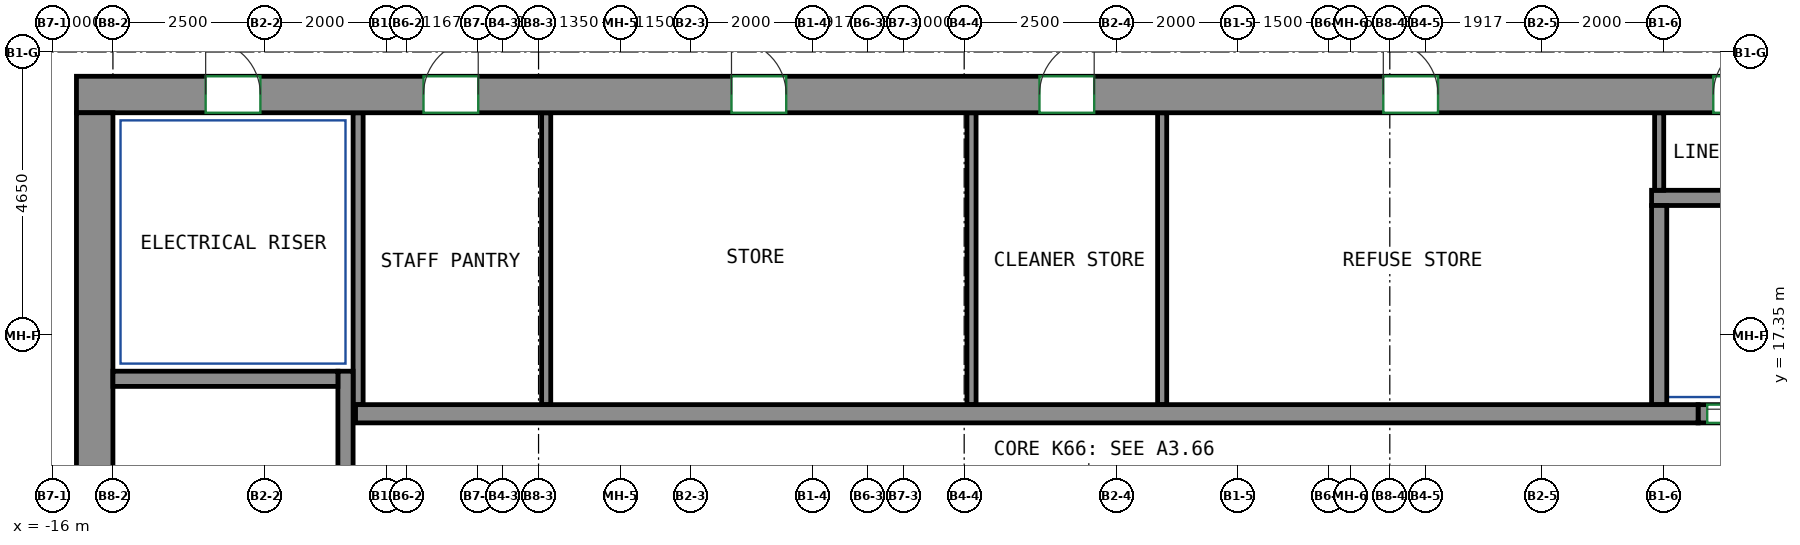
"""IFC4 building model, lengths in metres.
Left out: names, types, materials, properties, quantities, classifications, styles, units other than length and angle.
Written with IfcOpenShell. Run it as: python <this file> out.ifc"""

import sys

from ifc_helpers import new_model, si_unit, direction, frame, frame_2d, origin, place, context, subcontext, project, spatial, rectangle, extrude, source, transform, mapped, element, fill, save


model = new_model("IFC4")
c1 = context("Model", 3, precision=1e-05, world=origin(), true_north=direction((0.0, 1.0)))
c2 = subcontext(c1, "Body", "Model", "MODEL_VIEW")
j1 = project(units=[si_unit("LENGTHUNIT", "METRE"), si_unit("PLANEANGLEUNIT", "RADIAN")], contexts=[c1])
p1 = place(None, origin())
s1 = spatial("IfcSite", under=j1, at=p1, CompositionType="ELEMENT")
p2 = place(p1, origin())
s2 = spatial("IfcBuilding", under=s1, at=p2, CompositionType="ELEMENT")
p3 = place(p2, frame((0.0, 0.0, 267.0)))
s3 = spatial("IfcBuildingStorey", under=s2, at=p3, CompositionType="ELEMENT", Elevation=267.0)
m1 = source(origin(), c2, "Body", "SweptSolid", [
    extrude(rectangle(XDim=33.3, YDim=0.6, at=frame_2d((16.65, 0.0))), origin(), (0.0, 0.0, 1.0), 3.12),
])
p4 = place(p3, frame((-15.6, 21.3, 0.0), z_axis=(0.0, 0.0, 1.0), x_axis=(1.0, 0.0, 0.0)))
e1 = element("IfcWall", 1, at=p4, inside=s3, PredefinedType="SHEAR", context=c2, shape_type="MappedRepresentation", body=[
    mapped(m1, transform((0.0, 0.0, 0.0))),
])
p5 = place(p4, frame((5.708, 0.0, 0.0)))
e2 = element("IfcOpeningElement", 2, at=p5, cuts=e1, PredefinedType="OPENING", context=c2, shape_type="SweptSolid", body=[
    extrude(rectangle(XDim=0.9, YDim=2.1, at=frame_2d((0.45, 1.05))), frame((0.0, 0.31, 0.0), z_axis=(0.0, -1.0, 0.0), x_axis=(1.0, 0.0, 0.0)), (0.0, 0.0, 1.0), 0.62),
])
p6 = place(p4, frame((10.773, 0.0, 0.0)))
e3 = element("IfcOpeningElement", 3, at=p6, cuts=e1, PredefinedType="OPENING", context=c2, shape_type="SweptSolid", body=[
    extrude(rectangle(XDim=0.9, YDim=2.1, at=frame_2d((0.45, 1.05))), frame((0.0, 0.31, 0.0), z_axis=(0.0, -1.0, 0.0), x_axis=(1.0, 0.0, 0.0)), (0.0, 0.0, 1.0), 0.62),
])
p7 = place(p4, frame((15.838, 0.0, 0.0)))
e4 = element("IfcOpeningElement", 4, at=p7, cuts=e1, PredefinedType="OPENING", context=c2, shape_type="SweptSolid", body=[
    extrude(rectangle(XDim=0.9, YDim=2.1, at=frame_2d((0.45, 1.05))), frame((0.0, 0.31, 0.0), z_axis=(0.0, -1.0, 0.0), x_axis=(1.0, 0.0, 0.0)), (0.0, 0.0, 1.0), 0.62),
])
p8 = place(p4, frame((21.493, 0.0, 0.0)))
e5 = element("IfcOpeningElement", 5, at=p8, cuts=e1, PredefinedType="OPENING", context=c2, shape_type="SweptSolid", body=[
    extrude(rectangle(XDim=0.9, YDim=2.1, at=frame_2d((0.45, 1.05))), frame((0.0, 0.31, 0.0), z_axis=(0.0, -1.0, 0.0), x_axis=(1.0, 0.0, 0.0)), (0.0, 0.0, 1.0), 0.62),
])
p9 = place(p4, frame((26.92, 0.0, 0.0)))
e6 = element("IfcOpeningElement", 6, at=p9, cuts=e1, PredefinedType="OPENING", context=c2, shape_type="SweptSolid", body=[
    extrude(rectangle(XDim=0.9, YDim=2.1, at=frame_2d((0.45, 1.05))), frame((0.0, 0.31, 0.0), z_axis=(0.0, -1.0, 0.0), x_axis=(1.0, 0.0, 0.0)), (0.0, 0.0, 1.0), 0.62),
])
p10 = place(p4, frame((2.125, 0.0, 0.0)))
e7 = element("IfcOpeningElement", 7, at=p10, cuts=e1, PredefinedType="OPENING", context=c2, shape_type="SweptSolid", body=[
    extrude(rectangle(XDim=0.9, YDim=2.1, at=frame_2d((0.45, 1.05))), frame((0.0, 0.31, 0.0), z_axis=(0.0, -1.0, 0.0), x_axis=(1.0, 0.0, 0.0)), (0.0, 0.0, 1.0), 0.62),
])
p11 = place(p4, frame((30.275, 0.0, 0.0)))
e8 = element("IfcOpeningElement", 8, at=p11, cuts=e1, PredefinedType="OPENING", context=c2, shape_type="SweptSolid", body=[
    extrude(rectangle(XDim=0.9, YDim=2.1, at=frame_2d((0.45, 1.05))), frame((0.0, 0.31, 0.0), z_axis=(0.0, -1.0, 0.0), x_axis=(1.0, 0.0, 0.0)), (0.0, 0.0, 1.0), 0.62),
])
m2 = source(origin(), c2, "Body", "SweptSolid", [
    extrude(rectangle(XDim=12.0, YDim=0.6, at=frame_2d((6.0, 0.0))), origin(), (0.0, 0.0, 1.0), 3.12),
])
p12 = place(p3, frame((-15.3, 9.0, 0.0), z_axis=(0.0, 0.0, 1.0), x_axis=(0.0, 1.0, 0.0)))
e9 = element("IfcWall", 9, at=p12, inside=s3, PredefinedType="SHEAR", context=c2, shape_type="MappedRepresentation", body=[
    mapped(m2, transform((0.0, 0.0, 0.0))),
])
m3 = source(origin(), c2, "Body", "SweptSolid", [
    extrude(rectangle(XDim=7.75, YDim=0.25, at=frame_2d((3.875, 0.0))), origin(), (0.0, 0.0, 1.0), 3.12),
])
p13 = place(p3, frame((-11.175, 9.0, 0.0), z_axis=(0.0, 0.0, 1.0), x_axis=(0.0, 1.0, 0.0)))
e10 = element("IfcWall", 10, at=p13, inside=s3, PredefinedType="SHEAR", context=c2, shape_type="MappedRepresentation", body=[
    mapped(m3, transform((0.0, 0.0, 0.0))),
])
m4 = source(origin(), c2, "Body", "SweptSolid", [
    extrude(rectangle(XDim=3.7, YDim=0.25, at=frame_2d((1.85, 0.0))), origin(), (0.0, 0.0, 1.0), 3.12),
])
p14 = place(p3, frame((-15.0, 16.625, 0.0), z_axis=(0.0, 0.0, 1.0), x_axis=(1.0, 0.0, 0.0)))
e11 = element("IfcWall", 11, at=p14, inside=s3, PredefinedType="SHEAR", context=c2, shape_type="MappedRepresentation", body=[
    mapped(m4, transform((0.0, 0.0, 0.0))),
])
m5 = source(origin(), c2, "Body", "SweptSolid", [
    extrude(rectangle(XDim=22.08, YDim=0.3, at=frame_2d((11.04, 0.0))), origin(), (0.0, 0.0, 1.0), 3.12),
])
p15 = place(p3, frame((-11.01, 16.05, 0.0), z_axis=(0.0, 0.0, 1.0), x_axis=(1.0, 0.0, 0.0)))
e12 = element("IfcWall", 12, at=p15, inside=s3, PredefinedType="SHEAR", context=c2, shape_type="MappedRepresentation", body=[
    mapped(m5, transform((0.0, 0.0, 0.0))),
])
m6 = source(origin(), c2, "Body", "SweptSolid", [
    extrude(rectangle(XDim=1.4, YDim=0.3, at=frame_2d((0.7, 0.0))), origin(), (0.0, 0.0, 1.0), 3.12),
])
p16 = place(p3, frame((11.07, 16.05, 0.0), z_axis=(0.0, 0.0, 1.0), x_axis=(1.0, 0.0, 0.0)))
e13 = element("IfcWall", 13, at=p16, inside=s3, PredefinedType="PARTITIONING", context=c2, shape_type="MappedRepresentation", body=[
    mapped(m6, transform((0.0, 0.0, 0.0))),
])
p17 = place(p16, frame((0.15, 0.0, 0.0)))
e14 = element("IfcOpeningElement", 14, at=p17, cuts=e13, PredefinedType="OPENING", context=c2, shape_type="SweptSolid", body=[
    extrude(rectangle(XDim=1.1, YDim=2.1, at=frame_2d((0.55, 1.05))), frame((0.0, 0.16, 0.0), z_axis=(0.0, -1.0, 0.0), x_axis=(1.0, 0.0, 0.0)), (0.0, 0.0, 1.0), 0.32),
])
m7 = source(origin(), c2, "Body", "SweptSolid", [
    extrude(rectangle(XDim=2.93, YDim=0.25, at=frame_2d((1.465, 0.0))), origin(), (0.0, 0.0, 1.0), 3.12),
])
p18 = place(p3, frame((10.305, 19.6, 0.0), z_axis=(0.0, 0.0, 1.0), x_axis=(1.0, 0.0, 0.0)))
e15 = element("IfcWall", 15, at=p18, inside=s3, PredefinedType="PARTITIONING", context=c2, shape_type="MappedRepresentation", body=[
    mapped(m7, transform((0.0, 0.0, 0.0))),
])
m8 = source(origin(), c2, "Body", "SweptSolid", [
    extrude(rectangle(XDim=4.8, YDim=0.165, at=frame_2d((2.4, 0.0))), origin(), (0.0, 0.0, 1.0), 3.12),
])
p19 = place(p3, frame((-10.968, 16.2, 0.0), z_axis=(0.0, 0.0, 1.0), x_axis=(0.0, 1.0, 0.0)))
e16 = element("IfcWall", 16, at=p19, inside=s3, PredefinedType="PARTITIONING", context=c2, shape_type="MappedRepresentation", body=[
    mapped(m8, transform((0.0, 0.0, 0.0))),
])
m9 = source(origin(), c2, "Body", "SweptSolid", [
    extrude(rectangle(XDim=3.275, YDim=0.25, at=frame_2d((1.638, 0.0))), origin(), (0.0, 0.0, 1.0), 3.12),
])
p20 = place(p3, frame((10.43, 16.2, 0.0), z_axis=(0.0, 0.0, 1.0), x_axis=(0.0, 1.0, 0.0)))
e17 = element("IfcWall", 17, at=p20, inside=s3, PredefinedType="PARTITIONING", context=c2, shape_type="MappedRepresentation", body=[
    mapped(m9, transform((0.0, 0.0, 0.0))),
])
m10 = source(origin(), c2, "Body", "SweptSolid", [
    extrude(rectangle(XDim=4.8, YDim=0.15, at=frame_2d((2.4, 0.0))), origin(), (0.0, 0.0, 1.0), 3.12),
])
for number, where, z_axis, x_axis in (
    (18, (-7.875, 16.2, 0.0), (0.0, 0.0, 1.0), (0.0, 1.0, 0.0)),
    (19, (-0.88, 16.2, 0.0), (0.0, 0.0, 1.0), (0.0, 1.0, 0.0)),
    (20, (2.256, 16.2, 0.0), (0.0, 0.0, 1.0), (0.0, 1.0, 0.0)),
):
    element("IfcWall", number, at=place(p3, frame(where, z_axis=z_axis, x_axis=x_axis)), inside=s3, PredefinedType="PARTITIONING", context=c2, shape_type="MappedRepresentation", body=[
        mapped(m10, transform((0.0, 0.0, 0.0))),
    ])
m11 = source(origin(), c2, "Body", "SweptSolid", [
    extrude(rectangle(XDim=1.275, YDim=0.15, at=frame_2d((0.637, 0.0))), origin(), (0.0, 0.0, 1.0), 3.12),
])
p21 = place(p3, frame((10.43, 19.725, 0.0), z_axis=(0.0, 0.0, 1.0), x_axis=(0.0, 1.0, 0.0)))
e21 = element("IfcWall", 21, at=p21, inside=s3, PredefinedType="PARTITIONING", context=c2, shape_type="MappedRepresentation", body=[
    mapped(m11, transform((0.0, 0.0, 0.0))),
])
p22 = place(p17, origin())
e22 = element("IfcDoor", 22, at=p22, inside=s3, OperationType="DOUBLE_DOOR_SLIDING", PredefinedType="DOOR", context=c2, shape_type="SweptSolid", body=[
    extrude(rectangle(XDim=1.1, YDim=2.1, at=frame_2d((0.55, 1.05))), frame((0.0, 0.025, 0.0), z_axis=(0.0, -1.0, 0.0), x_axis=(1.0, 0.0, 0.0)), (0.0, 0.0, 1.0), 0.05),
])
fill(e14, e22)
p23 = place(p5, origin())
e23 = element("IfcDoor", 23, at=p23, inside=s3, OperationType="SINGLE_SWING_RIGHT", PredefinedType="DOOR", context=c2, shape_type="SweptSolid", body=[
    extrude(rectangle(XDim=0.9, YDim=2.1, at=frame_2d((0.45, 1.05))), frame((0.0, -0.155, 0.0), z_axis=(0.0, -1.0, 0.0), x_axis=(1.0, 0.0, 0.0)), (0.0, 0.0, 1.0), 0.05),
])
fill(e2, e23)
p24 = place(p6, origin())
e24 = element("IfcDoor", 24, at=p24, inside=s3, OperationType="SINGLE_SWING_LEFT", PredefinedType="DOOR", context=c2, shape_type="SweptSolid", body=[
    extrude(rectangle(XDim=0.9, YDim=2.1, at=frame_2d((0.45, 1.05))), frame((0.0, -0.155, 0.0), z_axis=(0.0, -1.0, 0.0), x_axis=(1.0, 0.0, 0.0)), (0.0, 0.0, 1.0), 0.05),
])
fill(e3, e24)
p25 = place(p7, origin())
e25 = element("IfcDoor", 25, at=p25, inside=s3, OperationType="SINGLE_SWING_RIGHT", PredefinedType="DOOR", context=c2, shape_type="SweptSolid", body=[
    extrude(rectangle(XDim=0.9, YDim=2.1, at=frame_2d((0.45, 1.05))), frame((0.0, -0.155, 0.0), z_axis=(0.0, -1.0, 0.0), x_axis=(1.0, 0.0, 0.0)), (0.0, 0.0, 1.0), 0.05),
])
fill(e4, e25)
p26 = place(p8, origin())
e26 = element("IfcDoor", 26, at=p26, inside=s3, OperationType="SINGLE_SWING_LEFT", PredefinedType="DOOR", context=c2, shape_type="SweptSolid", body=[
    extrude(rectangle(XDim=0.9, YDim=2.1, at=frame_2d((0.45, 1.05))), frame((0.0, -0.155, 0.0), z_axis=(0.0, -1.0, 0.0), x_axis=(1.0, 0.0, 0.0)), (0.0, 0.0, 1.0), 0.05),
])
fill(e5, e26)
p27 = place(p9, origin())
e27 = element("IfcDoor", 27, at=p27, inside=s3, OperationType="SINGLE_SWING_RIGHT", PredefinedType="DOOR", context=c2, shape_type="SweptSolid", body=[
    extrude(rectangle(XDim=0.9, YDim=2.1, at=frame_2d((0.45, 1.05))), frame((0.0, -0.155, 0.0), z_axis=(0.0, -1.0, 0.0), x_axis=(1.0, 0.0, 0.0)), (0.0, 0.0, 1.0), 0.05),
])
fill(e6, e27)
p28 = place(p10, origin())
e28 = element("IfcDoor", 28, at=p28, inside=s3, OperationType="SINGLE_SWING_LEFT", PredefinedType="DOOR", context=c2, shape_type="SweptSolid", body=[
    extrude(rectangle(XDim=0.9, YDim=2.1, at=frame_2d((0.45, 1.05))), frame((0.0, -0.155, 0.0), z_axis=(0.0, -1.0, 0.0), x_axis=(1.0, 0.0, 0.0)), (0.0, 0.0, 1.0), 0.05),
])
fill(e7, e28)
save(model, sys.argv[1])
